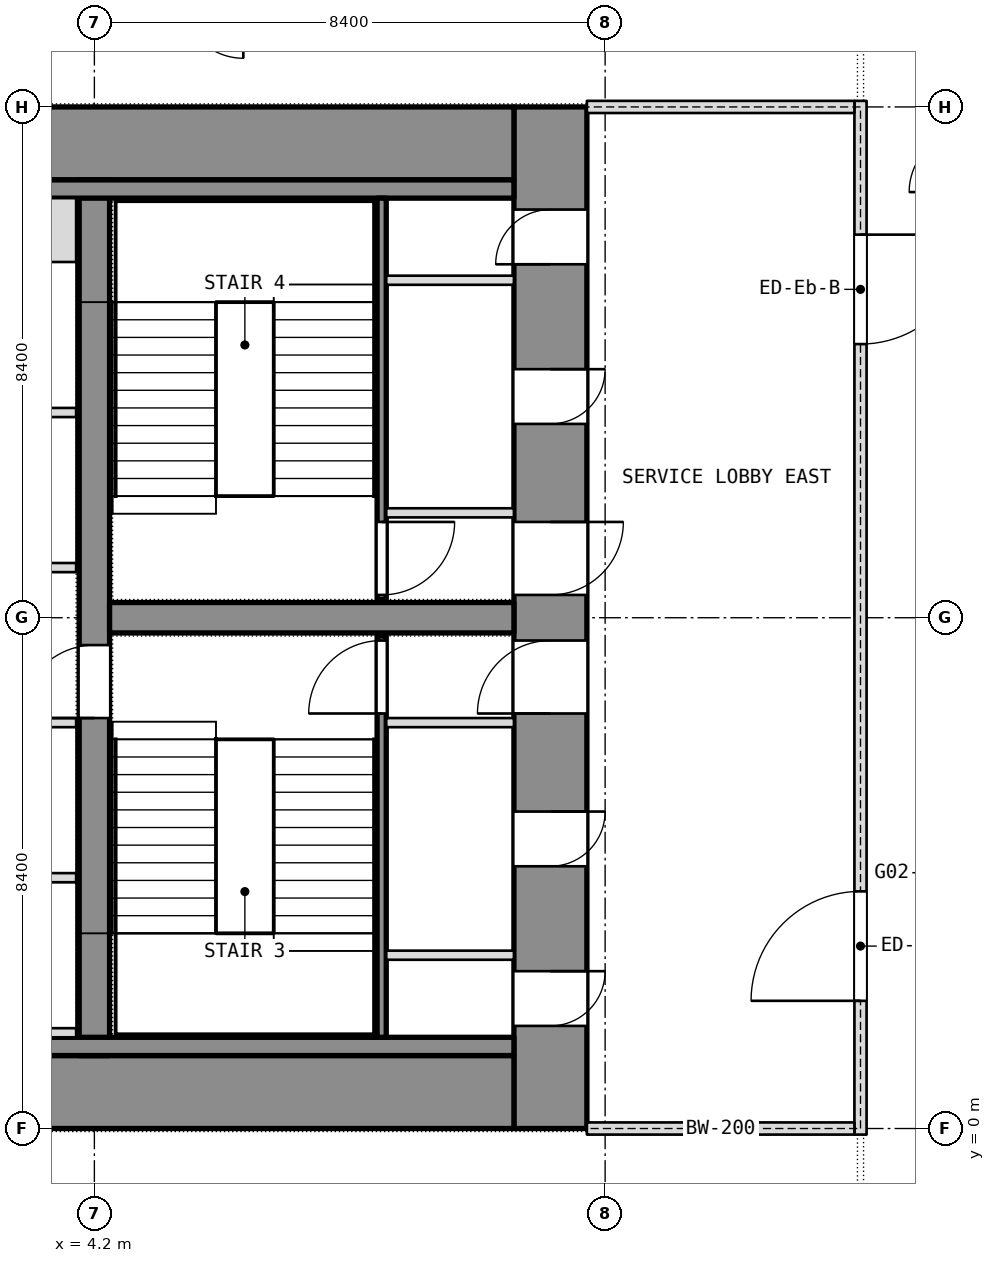
"""IFC4 building model, lengths in metres.
Left out: names, types, materials, properties, quantities, classifications, styles, units other than length and angle.
Written with IfcOpenShell. Run it as: python <this file> out.ifc"""

import sys

from ifc_helpers import new_model, si_unit, direction, frame, frame_2d, origin, place, context, subcontext, project, spatial, rectangle, extrude, element, fill, save


model = new_model("IFC4")
c1 = context("Model", 3, precision=1e-05, world=origin(), true_north=direction((0.0, 1.0)))
c2 = subcontext(c1, "Body", "Model", "MODEL_VIEW")
j1 = project(units=[si_unit("LENGTHUNIT", "METRE"), si_unit("PLANEANGLEUNIT", "RADIAN")], contexts=[c1])
p1 = place(None, origin())
s1 = spatial("IfcSite", under=j1, at=p1, CompositionType="ELEMENT")
p2 = place(p1, origin())
s2 = spatial("IfcBuilding", under=s1, at=p2, CompositionType="ELEMENT")
p3 = place(p2, frame((0.0, 0.0, 40.1)))
s3 = spatial("IfcBuildingStorey", under=s2, at=p3, CompositionType="ELEMENT", Elevation=40.1)
p4 = place(p3, frame((11.7, 0.0, 0.0), z_axis=(0.0, 0.0, 1.0), x_axis=(0.0, 1.0, 0.0)))
e1 = element("IfcWall", 1, at=p4, inside=s3, PredefinedType="SHEAR", context=c2, shape_type="SweptSolid", body=[
    extrude(rectangle(XDim=16.8, YDim=1.2, at=frame_2d((8.4, 0.0))), origin(), (0.0, 0.0, 1.0), 3.6),
])
p5 = place(p4, frame((1.688, 0.0, 0.0)))
e2 = element("IfcOpeningElement", 2, at=p5, cuts=e1, PredefinedType="OPENING", context=c2, shape_type="SweptSolid", body=[
    extrude(rectangle(XDim=0.9, YDim=2.1, at=frame_2d((0.45, 1.05))), frame((0.0, 0.6, 0.0), z_axis=(0.0, -1.0, 0.0), x_axis=(1.0, 0.0, 0.0)), (0.0, 0.0, 1.0), 1.2),
])
p6 = place(p4, frame((4.312, 0.0, 0.0)))
e3 = element("IfcOpeningElement", 3, at=p6, cuts=e1, PredefinedType="OPENING", context=c2, shape_type="SweptSolid", body=[
    extrude(rectangle(XDim=0.9, YDim=2.1, at=frame_2d((0.45, 1.05))), frame((0.0, 0.6, 0.0), z_axis=(0.0, -1.0, 0.0), x_axis=(1.0, 0.0, 0.0)), (0.0, 0.0, 1.0), 1.2),
])
p7 = place(p4, frame((6.825, 0.0, 0.0)))
e4 = element("IfcOpeningElement", 4, at=p7, cuts=e1, PredefinedType="OPENING", context=c2, shape_type="SweptSolid", body=[
    extrude(rectangle(XDim=1.2, YDim=2.1, at=frame_2d((0.6, 1.05))), frame((0.0, 0.6, 0.0), z_axis=(0.0, -1.0, 0.0), x_axis=(1.0, 0.0, 0.0)), (0.0, 0.0, 1.0), 1.2),
])
p8 = place(p4, frame((14.212, 0.0, 0.0)))
e5 = element("IfcOpeningElement", 5, at=p8, cuts=e1, PredefinedType="OPENING", context=c2, shape_type="SweptSolid", body=[
    extrude(rectangle(XDim=0.9, YDim=2.1, at=frame_2d((0.45, 1.05))), frame((0.0, 0.6, 0.0), z_axis=(0.0, -1.0, 0.0), x_axis=(1.0, 0.0, 0.0)), (0.0, 0.0, 1.0), 1.2),
])
p9 = place(p4, frame((11.587, 0.0, 0.0)))
e6 = element("IfcOpeningElement", 6, at=p9, cuts=e1, PredefinedType="OPENING", context=c2, shape_type="SweptSolid", body=[
    extrude(rectangle(XDim=0.9, YDim=2.1, at=frame_2d((0.45, 1.05))), frame((0.0, 0.6, 0.0), z_axis=(0.0, -1.0, 0.0), x_axis=(1.0, 0.0, 0.0)), (0.0, 0.0, 1.0), 1.2),
])
p10 = place(p4, frame((8.775, 0.0, 0.0)))
e7 = element("IfcOpeningElement", 7, at=p10, cuts=e1, PredefinedType="OPENING", context=c2, shape_type="SweptSolid", body=[
    extrude(rectangle(XDim=1.2, YDim=2.1, at=frame_2d((0.6, 1.05))), frame((0.0, 0.6, 0.0), z_axis=(0.0, -1.0, 0.0), x_axis=(1.0, 0.0, 0.0)), (0.0, 0.0, 1.0), 1.2),
])
for number, where, z_axis, x_axis in (
    (8, (-11.1, 0.6, 0.0), (0.0, 0.0, 1.0), (1.0, 0.0, 0.0)),
    (9, (-11.1, 16.2, 0.0), (0.0, 0.0, 1.0), (1.0, 0.0, 0.0)),
):
    element("IfcWall", number, at=place(p3, frame(where, z_axis=z_axis, x_axis=x_axis)), inside=s3, PredefinedType="SHEAR", context=c2, shape_type="SweptSolid", body=[
        extrude(rectangle(XDim=22.2, YDim=1.2, at=frame_2d((11.1, 0.0))), origin(), (0.0, 0.0, 1.0), 3.6),
    ])
p11 = place(p3, frame((4.2, 1.2, 0.0), z_axis=(0.0, 0.0, 1.0), x_axis=(0.0, 1.0, 0.0)))
e10 = element("IfcWall", 10, at=p11, inside=s3, PredefinedType="SHEAR", context=c2, shape_type="SweptSolid", body=[
    extrude(rectangle(XDim=14.4, YDim=0.5, at=frame_2d((7.2, 0.0))), origin(), (0.0, 0.0, 1.0), 3.6),
])
p12 = place(p11, frame((5.55, 0.0, 0.0)))
e11 = element("IfcOpeningElement", 11, at=p12, cuts=e10, PredefinedType="OPENING", context=c2, shape_type="SweptSolid", body=[
    extrude(rectangle(XDim=1.2, YDim=2.1, at=frame_2d((0.6, 1.05))), frame((0.0, 0.25, 0.0), z_axis=(0.0, -1.0, 0.0), x_axis=(1.0, 0.0, 0.0)), (0.0, 0.0, 1.0), 0.5),
])
p13 = place(p3, frame((4.45, 8.4, 0.0), z_axis=(0.0, 0.0, 1.0), x_axis=(1.0, 0.0, 0.0)))
e12 = element("IfcWall", 12, at=p13, inside=s3, PredefinedType="SHEAR", context=c2, shape_type="SweptSolid", body=[
    extrude(rectangle(XDim=6.65, YDim=0.5, at=frame_2d((3.325, 0.0))), origin(), (0.0, 0.0, 1.0), 3.6),
])
for number, where, z_axis, x_axis in (
    (13, (-11.1, 1.35, 0.0), (0.0, 0.0, 1.0), (1.0, 0.0, 0.0)),
    (14, (-11.1, 15.45, 0.0), (0.0, 0.0, 1.0), (1.0, 0.0, 0.0)),
):
    element("IfcWall", number, at=place(p3, frame(where, z_axis=z_axis, x_axis=x_axis)), inside=s3, PredefinedType="PARTITIONING", context=c2, shape_type="SweptSolid", body=[
        extrude(rectangle(XDim=22.2, YDim=0.3, at=frame_2d((11.1, 0.0))), origin(), (0.0, 0.0, 1.0), 3.34),
    ])
p14 = place(p3, frame((8.925, 1.5, 0.0), z_axis=(0.0, 0.0, 1.0), x_axis=(0.0, 1.0, 0.0)))
e15 = element("IfcWall", 15, at=p14, inside=s3, PredefinedType="SHEAR", context=c2, shape_type="SweptSolid", body=[
    extrude(rectangle(XDim=6.6, YDim=0.15, at=frame_2d((3.3, 0.0))), origin(), (0.0, 0.0, 1.0), 3.34),
])
p15 = place(p14, frame((5.325, 0.0, 0.0)))
e16 = element("IfcOpeningElement", 16, at=p15, cuts=e15, PredefinedType="OPENING", context=c2, shape_type="SweptSolid", body=[
    extrude(rectangle(XDim=1.2, YDim=2.1, at=frame_2d((0.6, 1.05))), frame((0.0, 0.075, 0.0), z_axis=(0.0, -1.0, 0.0), x_axis=(1.0, 0.0, 0.0)), (0.0, 0.0, 1.0), 0.15),
])
for number, where, z_axis, x_axis in (
    (17, (9.0, 6.675, 0.0), (0.0, 0.0, 1.0), (1.0, 0.0, 0.0)),
    (18, (9.0, 2.85, 0.0), (0.0, 0.0, 1.0), (1.0, 0.0, 0.0)),
):
    element("IfcWall", number, at=place(p3, frame(where, z_axis=z_axis, x_axis=x_axis)), inside=s3, PredefinedType="PARTITIONING", context=c2, shape_type="SweptSolid", body=[
        extrude(rectangle(XDim=2.1, YDim=0.15, at=frame_2d((1.05, 0.0))), origin(), (0.0, 0.0, 1.0), 3.34),
    ])
p16 = place(p3, frame((8.925, 8.7, 0.0), z_axis=(0.0, 0.0, 1.0), x_axis=(0.0, 1.0, 0.0)))
e19 = element("IfcWall", 19, at=p16, inside=s3, PredefinedType="SHEAR", context=c2, shape_type="SweptSolid", body=[
    extrude(rectangle(XDim=6.6, YDim=0.15, at=frame_2d((3.3, 0.0))), origin(), (0.0, 0.0, 1.0), 3.34),
])
p17 = place(p16, frame((0.075, 0.0, 0.0)))
e20 = element("IfcOpeningElement", 20, at=p17, cuts=e19, PredefinedType="OPENING", context=c2, shape_type="SweptSolid", body=[
    extrude(rectangle(XDim=1.2, YDim=2.1, at=frame_2d((0.6, 1.05))), frame((0.0, 0.075, 0.0), z_axis=(0.0, -1.0, 0.0), x_axis=(1.0, 0.0, 0.0)), (0.0, 0.0, 1.0), 0.15),
])
for number, where, z_axis, x_axis in (
    (21, (9.0, 10.125, 0.0), (0.0, 0.0, 1.0), (1.0, 0.0, 0.0)),
    (22, (9.0, 13.95, 0.0), (0.0, 0.0, 1.0), (1.0, 0.0, 0.0)),
):
    element("IfcWall", number, at=place(p3, frame(where, z_axis=z_axis, x_axis=x_axis)), inside=s3, PredefinedType="PARTITIONING", context=c2, shape_type="SweptSolid", body=[
        extrude(rectangle(XDim=2.1, YDim=0.15, at=frame_2d((1.05, 0.0))), origin(), (0.0, 0.0, 1.0), 3.34),
    ])
p18 = place(p3, frame((-3.9, 4.125, 0.0), z_axis=(0.0, 0.0, 1.0), x_axis=(1.0, 0.0, 0.0)))
e23 = element("IfcWall", 23, at=p18, inside=s3, PredefinedType="PARTITIONING", context=c2, shape_type="SweptSolid", body=[
    extrude(rectangle(XDim=7.8, YDim=0.15, at=frame_2d((3.9, 0.0))), origin(), (0.0, 0.0, 1.0), 3.34),
])
p19 = place(p18, frame((3.75, 0.0, 0.0)))
e24 = element("IfcOpeningElement", 24, at=p19, cuts=e23, PredefinedType="OPENING", context=c2, shape_type="SweptSolid", body=[
    extrude(rectangle(XDim=1.2, YDim=2.1, at=frame_2d((0.6, 1.05))), frame((0.0, 0.075, 0.0), z_axis=(0.0, -1.0, 0.0), x_axis=(1.0, 0.0, 0.0)), (0.0, 0.0, 1.0), 0.15),
])
p20 = place(p3, frame((-3.9, 11.775, 0.0), z_axis=(0.0, 0.0, 1.0), x_axis=(1.0, 0.0, 0.0)))
e25 = element("IfcWall", 25, at=p20, inside=s3, PredefinedType="PARTITIONING", context=c2, shape_type="SweptSolid", body=[
    extrude(rectangle(XDim=7.8, YDim=0.15, at=frame_2d((3.9, 0.0))), origin(), (0.0, 0.0, 1.0), 3.34),
])
p21 = place(p20, frame((3.3, 0.0, 0.0)))
e26 = element("IfcOpeningElement", 26, at=p21, cuts=e25, PredefinedType="OPENING", context=c2, shape_type="SweptSolid", body=[
    extrude(rectangle(XDim=1.2, YDim=2.1, at=frame_2d((0.6, 1.05))), frame((0.0, 0.075, 0.0), z_axis=(0.0, -1.0, 0.0), x_axis=(1.0, 0.0, 0.0)), (0.0, 0.0, 1.0), 0.15),
])
p22 = place(p3, frame((1.65, 1.575, 0.0), z_axis=(0.0, 0.0, 1.0), x_axis=(1.0, 0.0, 0.0)))
e27 = element("IfcWall", 27, at=p22, inside=s3, PredefinedType="SHEAR", context=c2, shape_type="SweptSolid", body=[
    extrude(rectangle(XDim=2.25, YDim=0.15, at=frame_2d((1.125, 0.0))), origin(), (0.0, 0.0, 1.0), 3.6),
])
p23 = place(p3, frame((1.65, 14.775, 0.0), z_axis=(0.0, 0.0, 1.0), x_axis=(1.0, 0.0, 0.0)))
e28 = element("IfcWall", 28, at=p23, inside=s3, PredefinedType="SHEAR", context=c2, shape_type="SweptSolid", body=[
    extrude(rectangle(XDim=2.25, YDim=1.05, at=frame_2d((1.125, 0.0))), origin(), (0.0, 0.0, 1.0), 3.6),
])
for number, where, z_axis, x_axis in (
    (29, (1.65, 6.675, 0.0), (0.0, 0.0, 1.0), (1.0, 0.0, 0.0)),
    (30, (1.65, 9.225, 0.0), (0.0, 0.0, 1.0), (1.0, 0.0, 0.0)),
):
    element("IfcWall", number, at=place(p3, frame(where, z_axis=z_axis, x_axis=x_axis)), inside=s3, PredefinedType="SHEAR", context=c2, shape_type="SweptSolid", body=[
        extrude(rectangle(XDim=2.25, YDim=0.15, at=frame_2d((1.125, 0.0))), origin(), (0.0, 0.0, 1.0), 3.6),
    ])
p24 = place(p3, frame((16.8, -0.1, 0.0), z_axis=(0.0, 0.0, 1.0), x_axis=(0.0, 1.0, 0.0)))
e31 = element("IfcWall", 31, at=p24, inside=s3, PredefinedType="PARTITIONING", context=c2, shape_type="SweptSolid", body=[
    extrude(rectangle(XDim=17.0, YDim=0.2, at=frame_2d((8.5, 0.0))), origin(), (0.0, 0.0, 1.0), 3.34),
])
p25 = place(p24, frame((2.2, 0.0, 0.0)))
e32 = element("IfcOpeningElement", 32, at=p25, cuts=e31, PredefinedType="OPENING", context=c2, shape_type="SweptSolid", body=[
    extrude(rectangle(XDim=1.8, YDim=2.1, at=frame_2d((0.9, 1.05))), frame((0.0, 0.1, 0.0), z_axis=(0.0, -1.0, 0.0), x_axis=(1.0, 0.0, 0.0)), (0.0, 0.0, 1.0), 0.2),
])
p26 = place(p24, frame((13.0, 0.0, 0.0)))
e33 = element("IfcOpeningElement", 33, at=p26, cuts=e31, PredefinedType="OPENING", context=c2, shape_type="SweptSolid", body=[
    extrude(rectangle(XDim=1.8, YDim=2.1, at=frame_2d((0.9, 1.05))), frame((0.0, 0.1, 0.0), z_axis=(0.0, -1.0, 0.0), x_axis=(1.0, 0.0, 0.0)), (0.0, 0.0, 1.0), 0.2),
])
for number, where, z_axis, x_axis in (
    (34, (12.3, 0.0, 0.0), (0.0, 0.0, 1.0), (1.0, 0.0, 0.0)),
    (35, (12.3, 16.8, 0.0), (0.0, 0.0, 1.0), (1.0, 0.0, 0.0)),
):
    element("IfcWall", number, at=place(p3, frame(where, z_axis=z_axis, x_axis=x_axis)), inside=s3, PredefinedType="PARTITIONING", context=c2, shape_type="SweptSolid", body=[
        extrude(rectangle(XDim=4.4, YDim=0.2, at=frame_2d((2.2, 0.0))), origin(), (0.0, 0.0, 1.0), 2.84),
    ])
p27 = place(p5, origin())
e36 = element("IfcDoor", 36, at=p27, inside=s3, OperationType="SINGLE_SWING_LEFT", PredefinedType="DOOR", context=c2, shape_type="SweptSolid", body=[
    extrude(rectangle(XDim=0.9, YDim=2.1, at=frame_2d((0.45, 1.05))), frame((0.0, 0.025, 0.0), z_axis=(0.0, -1.0, 0.0), x_axis=(1.0, 0.0, 0.0)), (0.0, 0.0, 1.0), 0.05),
])
fill(e2, e36)
p28 = place(p6, origin())
e37 = element("IfcDoor", 37, at=p28, inside=s3, OperationType="SINGLE_SWING_LEFT", PredefinedType="DOOR", context=c2, shape_type="SweptSolid", body=[
    extrude(rectangle(XDim=0.9, YDim=2.1, at=frame_2d((0.45, 1.05))), frame((0.0, 0.025, 0.0), z_axis=(0.0, -1.0, 0.0), x_axis=(1.0, 0.0, 0.0)), (0.0, 0.0, 1.0), 0.05),
])
fill(e3, e37)
p29 = place(p7, origin())
e38 = element("IfcDoor", 38, at=p29, inside=s3, OperationType="SINGLE_SWING_LEFT", PredefinedType="DOOR", context=c2, shape_type="SweptSolid", body=[
    extrude(rectangle(XDim=1.2, YDim=2.1, at=frame_2d((0.6, 1.05))), frame((0.0, 0.025, 0.0), z_axis=(0.0, -1.0, 0.0), x_axis=(1.0, 0.0, 0.0)), (0.0, 0.0, 1.0), 0.05),
])
fill(e4, e38)
p30 = place(p15, origin())
e39 = element("IfcDoor", 39, at=p30, inside=s3, OperationType="SINGLE_SWING_LEFT", PredefinedType="DOOR", context=c2, shape_type="SweptSolid", body=[
    extrude(rectangle(XDim=1.2, YDim=2.1, at=frame_2d((0.6, 1.05))), frame((0.0, 0.025, 0.0), z_axis=(0.0, -1.0, 0.0), x_axis=(1.0, 0.0, 0.0)), (0.0, 0.0, 1.0), 0.05),
])
fill(e16, e39)
p31 = place(p8, origin())
e40 = element("IfcDoor", 40, at=p31, inside=s3, OperationType="SINGLE_SWING_LEFT", PredefinedType="DOOR", context=c2, shape_type="SweptSolid", body=[
    extrude(rectangle(XDim=0.9, YDim=2.1, at=frame_2d((0.45, 1.05))), frame((0.0, 0.025, 0.0), z_axis=(0.0, -1.0, 0.0), x_axis=(1.0, 0.0, 0.0)), (0.0, 0.0, 1.0), 0.05),
])
fill(e5, e40)
p32 = place(p9, origin())
e41 = element("IfcDoor", 41, at=p32, inside=s3, OperationType="SINGLE_SWING_LEFT", PredefinedType="DOOR", context=c2, shape_type="SweptSolid", body=[
    extrude(rectangle(XDim=0.9, YDim=2.1, at=frame_2d((0.45, 1.05))), frame((0.0, 0.025, 0.0), z_axis=(0.0, -1.0, 0.0), x_axis=(1.0, 0.0, 0.0)), (0.0, 0.0, 1.0), 0.05),
])
fill(e6, e41)
p33 = place(p10, origin())
e42 = element("IfcDoor", 42, at=p33, inside=s3, OperationType="SINGLE_SWING_LEFT", PredefinedType="DOOR", context=c2, shape_type="SweptSolid", body=[
    extrude(rectangle(XDim=1.2, YDim=2.1, at=frame_2d((0.6, 1.05))), frame((0.0, 0.025, 0.0), z_axis=(0.0, -1.0, 0.0), x_axis=(1.0, 0.0, 0.0)), (0.0, 0.0, 1.0), 0.05),
])
fill(e7, e42)
p34 = place(p17, origin())
e43 = element("IfcDoor", 43, at=p34, inside=s3, OperationType="SINGLE_SWING_LEFT", PredefinedType="DOOR", context=c2, shape_type="SweptSolid", body=[
    extrude(rectangle(XDim=1.2, YDim=2.1, at=frame_2d((0.6, 1.05))), frame((0.0, 0.025, 0.0), z_axis=(0.0, -1.0, 0.0), x_axis=(1.0, 0.0, 0.0)), (0.0, 0.0, 1.0), 0.05),
])
fill(e20, e43)
p35 = place(p12, origin())
e44 = element("IfcDoor", 44, at=p35, inside=s3, OperationType="SINGLE_SWING_LEFT", PredefinedType="DOOR", context=c2, shape_type="SweptSolid", body=[
    extrude(rectangle(XDim=1.2, YDim=2.1, at=frame_2d((0.6, 1.05))), frame((0.0, 0.025, 0.0), z_axis=(0.0, -1.0, 0.0), x_axis=(1.0, 0.0, 0.0)), (0.0, 0.0, 1.0), 0.05),
])
fill(e11, e44)
p36 = place(p25, origin())
e45 = element("IfcDoor", 45, at=p36, inside=s3, OperationType="DOUBLE_DOOR_SINGLE_SWING", PredefinedType="DOOR", context=c2, shape_type="SweptSolid", body=[
    extrude(rectangle(XDim=1.8, YDim=2.1, at=frame_2d((0.9, 1.05))), frame((0.0, 0.025, 0.0), z_axis=(0.0, -1.0, 0.0), x_axis=(1.0, 0.0, 0.0)), (0.0, 0.0, 1.0), 0.05),
])
fill(e32, e45)
p37 = place(p26, origin())
e46 = element("IfcDoor", 46, at=p37, inside=s3, OperationType="DOUBLE_DOOR_SINGLE_SWING", PredefinedType="DOOR", context=c2, shape_type="SweptSolid", body=[
    extrude(rectangle(XDim=1.8, YDim=2.1, at=frame_2d((0.9, 1.05))), frame((0.0, 0.025, 0.0), z_axis=(0.0, -1.0, 0.0), x_axis=(1.0, 0.0, 0.0)), (0.0, 0.0, 1.0), 0.05),
])
fill(e33, e46)
save(model, sys.argv[1])
